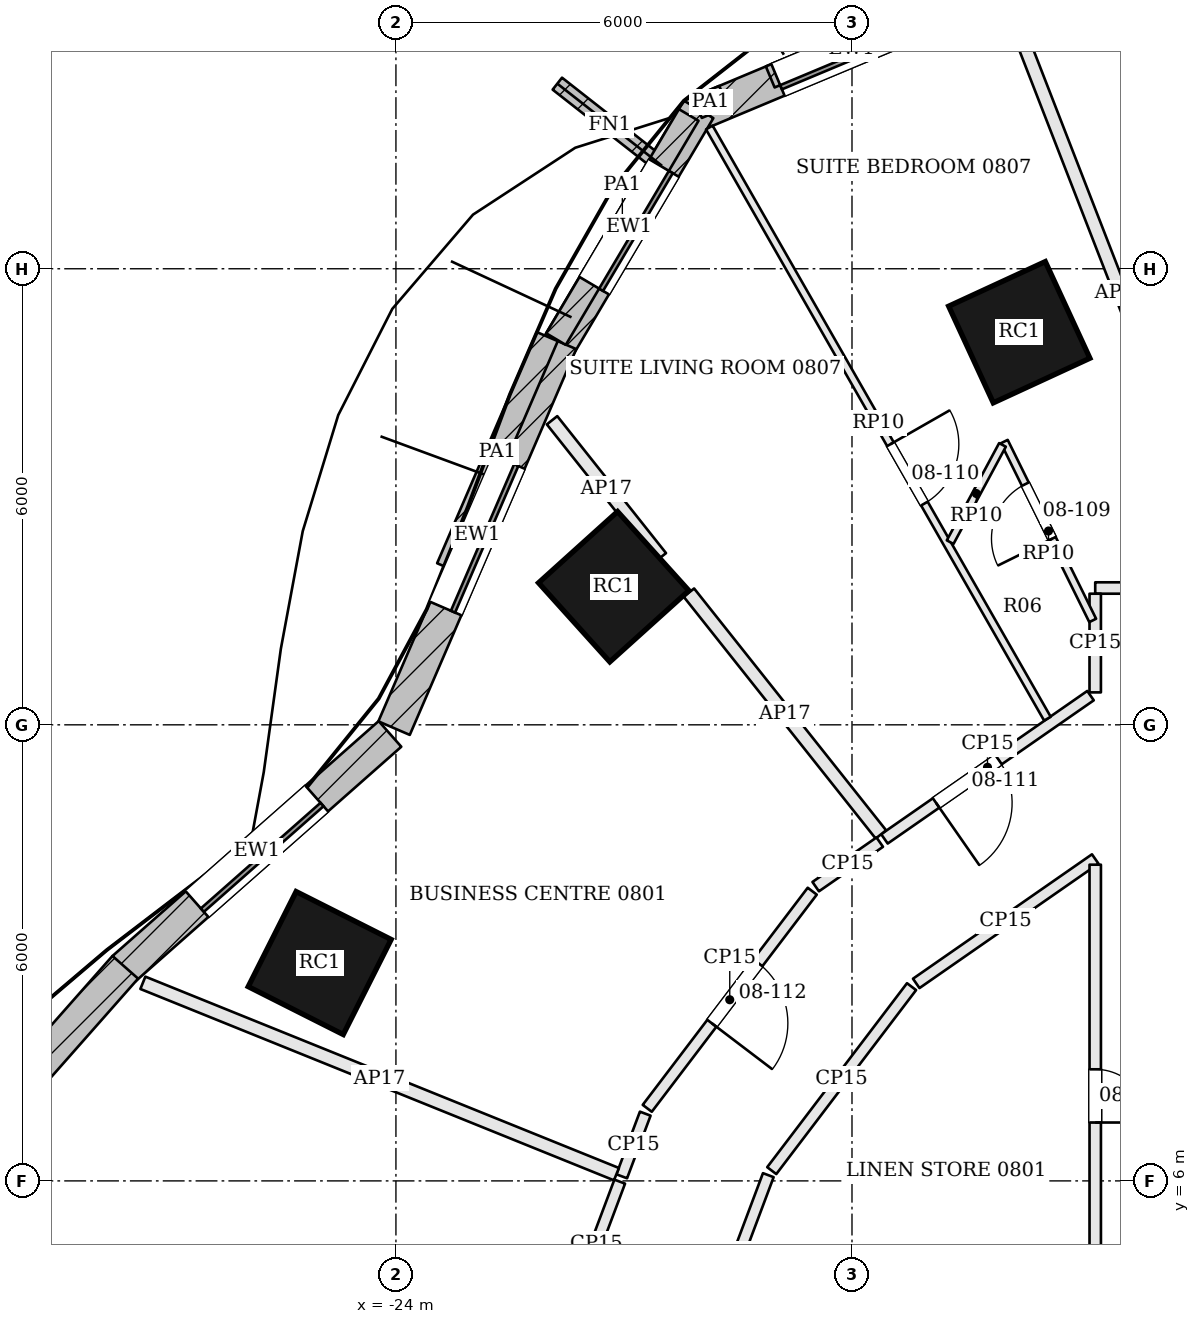
"""IFC4 building model, lengths in metres.
Left out: names, types, materials, properties, quantities, classifications, styles, units other than length and angle.
Written with IfcOpenShell. Run it as: python <this file> out.ifc"""

import sys

from ifc_helpers import new_model, si_unit, direction, frame, frame_2d, origin, origin_2d, place, context, subcontext, project, spatial, rectangle, extrude, element, fill, save


model = new_model("IFC4")
c1 = context("Model", 3, precision=1e-05, world=origin(), true_north=direction((0.0, 1.0)))
c2 = subcontext(c1, "Body", "Model", "MODEL_VIEW")
j1 = project(units=[si_unit("LENGTHUNIT", "METRE"), si_unit("PLANEANGLEUNIT", "RADIAN")], contexts=[c1])
p1 = place(None, origin())
s1 = spatial("IfcSite", under=j1, at=p1, CompositionType="ELEMENT")
p2 = place(p1, origin())
s2 = spatial("IfcBuilding", under=s1, at=p2, CompositionType="ELEMENT")
p3 = place(p2, frame((0.0, 0.0, 44.7)))
s3 = spatial("IfcBuildingStorey", under=s2, at=p3, CompositionType="ELEMENT", Elevation=44.7)
for number, where, z_axis, x_axis in (
    (1, (-15.799, 17.165, 0.0), (0.0, 0.0, 1.0), (-0.908, -0.419, 0.0)),
    (2, (-21.135, 13.817, 0.0), (0.0, 0.0, 1.0), (-0.743, -0.67, 0.0)),
    (3, (-25.003, 8.866, 0.0), (0.0, 0.0, 1.0), (-0.45, -0.893, 0.0)),
):
    element("IfcColumn", number, at=place(p3, frame(where, z_axis=z_axis, x_axis=x_axis)), inside=s3, PredefinedType="COLUMN", context=c2, shape_type="SweptSolid", body=[
        extrude(rectangle(XDim=1.4, YDim=1.4, at=origin_2d()), origin(), (0.0, 0.0, 1.0), 3.6),
    ])
p4 = place(p3, frame((-10.76, 20.698, 0.0), z_axis=(0.0, 0.0, 1.0), x_axis=(-0.980072890434, 0.198638187256, 0.0)))
e4 = element("IfcWall", 4, at=p4, inside=s3, PredefinedType="SOLIDWALL", context=c2, shape_type="SweptSolid", body=[
    extrude(rectangle(XDim=5.36, YDim=0.45, at=frame_2d((2.68, 0.0))), origin(), (0.0, 0.0, 1.0), 3.4),
])
p5 = place(p4, frame((1.63, 0.0, 0.9)))
e5 = element("IfcOpeningElement", 5, at=p5, cuts=e4, PredefinedType="OPENING", context=c2, shape_type="SweptSolid", body=[
    extrude(rectangle(XDim=2.1, YDim=2.0, at=frame_2d((1.05, 1.0))), frame((0.0, 0.235, 0.0), z_axis=(0.0, -1.0, 0.0), x_axis=(1.0, 0.0, 0.0)), (0.0, 0.0, 1.0), 0.47),
])
p6 = place(p3, frame((-15.886, 21.776, 0.0), z_axis=(0.0, 0.0, 1.0), x_axis=(-0.922527247898, -0.385931958882, 0.0)))
e6 = element("IfcWall", 6, at=p6, inside=s3, PredefinedType="SOLIDWALL", context=c2, shape_type="SweptSolid", body=[
    extrude(rectangle(XDim=4.594, YDim=0.45, at=frame_2d((2.297, 0.0))), origin(), (0.0, 0.0, 1.0), 3.4),
])
p7 = place(p6, frame((1.247, 0.0, 0.9)))
e7 = element("IfcOpeningElement", 7, at=p7, cuts=e6, PredefinedType="OPENING", context=c2, shape_type="SweptSolid", body=[
    extrude(rectangle(XDim=2.1, YDim=2.0, at=frame_2d((1.05, 1.0))), frame((0.0, 0.235, 0.0), z_axis=(0.0, -1.0, 0.0), x_axis=(1.0, 0.0, 0.0)), (0.0, 0.0, 1.0), 0.47),
])
p8 = place(p3, frame((-20.017, 20.096, 0.0), z_axis=(0.0, 0.0, 1.0), x_axis=(-0.509718522454, -0.860341227576, 0.0)))
e8 = element("IfcWall", 8, at=p8, inside=s3, PredefinedType="SOLIDWALL", context=c2, shape_type="SweptSolid", body=[
    extrude(rectangle(XDim=3.591, YDim=0.45, at=frame_2d((1.795, 0.0))), origin(), (0.0, 0.0, 1.0), 3.4),
])
p9 = place(p8, frame((0.896, 0.0, 0.9)))
e9 = element("IfcOpeningElement", 9, at=p9, cuts=e8, PredefinedType="OPENING", context=c2, shape_type="SweptSolid", body=[
    extrude(rectangle(XDim=1.8, YDim=2.0, at=frame_2d((0.9, 1.0))), frame((0.0, 0.235, 0.0), z_axis=(0.0, -1.0, 0.0), x_axis=(1.0, 0.0, 0.0)), (0.0, 0.0, 1.0), 0.47),
])
p10 = place(p3, frame((-21.835, 17.032, 0.0), z_axis=(0.0, 0.0, 1.0), x_axis=(-0.396103523022, -0.918205858753, 0.0)))
e10 = element("IfcWall", 10, at=p10, inside=s3, PredefinedType="SOLIDWALL", context=c2, shape_type="SweptSolid", body=[
    extrude(rectangle(XDim=5.528, YDim=0.45, at=frame_2d((2.764, 0.0))), origin(), (0.0, 0.0, 1.0), 3.4),
])
p11 = place(p10, frame((1.714, 0.0, 0.9)))
e11 = element("IfcOpeningElement", 11, at=p11, cuts=e10, PredefinedType="OPENING", context=c2, shape_type="SweptSolid", body=[
    extrude(rectangle(XDim=2.1, YDim=2.0, at=frame_2d((1.05, 1.0))), frame((0.0, 0.235, 0.0), z_axis=(0.0, -1.0, 0.0), x_axis=(1.0, 0.0, 0.0)), (0.0, 0.0, 1.0), 0.47),
])
p12 = place(p3, frame((-24.078, 11.88, 0.0), z_axis=(0.0, 0.0, 1.0), x_axis=(-0.749778352475, -0.661689067583, 0.0)))
e12 = element("IfcWall", 12, at=p12, inside=s3, PredefinedType="SOLIDWALL", context=c2, shape_type="SweptSolid", body=[
    extrude(rectangle(XDim=4.67, YDim=0.45, at=frame_2d((2.335, 0.0))), origin(), (0.0, 0.0, 1.0), 3.4),
])
p13 = place(p12, frame((1.285, 0.0, 0.9)))
e13 = element("IfcOpeningElement", 13, at=p13, cuts=e12, PredefinedType="OPENING", context=c2, shape_type="SweptSolid", body=[
    extrude(rectangle(XDim=2.1, YDim=2.0, at=frame_2d((1.05, 1.0))), frame((0.0, 0.235, 0.0), z_axis=(0.0, -1.0, 0.0), x_axis=(1.0, 0.0, 0.0)), (0.0, 0.0, 1.0), 0.47),
])
p14 = place(p3, frame((-27.561, 8.81, 0.0), z_axis=(0.0, 0.0, 1.0), x_axis=(-0.661706312809, -0.749763132989, 0.0)))
e14 = element("IfcWall", 14, at=p14, inside=s3, PredefinedType="SOLIDWALL", context=c2, shape_type="SweptSolid", body=[
    extrude(rectangle(XDim=5.34, YDim=0.45, at=frame_2d((2.67, 0.0))), origin(), (0.0, 0.0, 1.0), 3.4),
])
p15 = place(p14, frame((1.77, 0.0, 0.9)))
e15 = element("IfcOpeningElement", 15, at=p15, cuts=e14, PredefinedType="OPENING", context=c2, shape_type="SweptSolid", body=[
    extrude(rectangle(XDim=1.8, YDim=2.0, at=frame_2d((0.9, 1.0))), frame((0.0, 0.235, 0.0), z_axis=(0.0, -1.0, 0.0), x_axis=(1.0, 0.0, 0.0)), (0.0, 0.0, 1.0), 0.47),
])
p16 = place(p3, frame((-20.5, 19.355, 0.0), z_axis=(0.0, 0.0, 1.0), x_axis=(-0.786700632228, 0.617334686577, 0.0)))
e16 = element("IfcWall", 16, at=p16, inside=s3, PredefinedType="SOLIDWALL", context=c2, shape_type="SweptSolid", body=[
    extrude(rectangle(XDim=1.75, YDim=0.2, at=frame_2d((0.875, 0.0))), origin(), (0.0, 0.0, 1.0), 3.4),
])
p17 = place(p3, frame((-16.962, 21.407, 3.6), z_axis=(0.0, 0.0, 1.0), x_axis=(-0.922533659014, -0.385916633467, 0.0)))
e17 = element("IfcWall", 17, at=p17, inside=s3, PredefinedType="PARAPET", context=c2, shape_type="SweptSolid", body=[
    extrude(rectangle(XDim=2.291, YDim=0.3, at=frame_2d((1.146, 0.0))), origin(), (0.0, 0.0, 1.0), 1.1),
])
p18 = place(p3, frame((-19.688, 20.267, 3.6), z_axis=(0.0, 0.0, 1.0), x_axis=(-0.922419372029, -0.386189722943, 0.0)))
e18 = element("IfcWall", 18, at=p18, inside=s3, PredefinedType="PARAPET", context=c2, shape_type="SweptSolid", body=[
    extrude(rectangle(XDim=0.374, YDim=0.3, at=frame_2d((0.187, 0.0))), origin(), (0.0, 0.0, 1.0), 1.1),
])
p19 = place(p3, frame((-20.148, 20.023, 3.6), z_axis=(0.0, 0.0, 1.0), x_axis=(-0.509657876052, -0.860377155309, 0.0)))
e19 = element("IfcWall", 19, at=p19, inside=s3, PredefinedType="PARAPET", context=c2, shape_type="SweptSolid", body=[
    extrude(rectangle(XDim=3.427, YDim=0.3, at=frame_2d((1.713, 0.0))), origin(), (0.0, 0.0, 1.0), 1.1),
])
p20 = place(p3, frame((-22.009, 17.107, 3.6), z_axis=(0.0, 0.0, 1.0), x_axis=(-0.396142292889, -0.918189132905, 0.0)))
e20 = element("IfcWall", 20, at=p20, inside=s3, PredefinedType="PARAPET", context=c2, shape_type="SweptSolid", body=[
    extrude(rectangle(XDim=3.312, YDim=0.3, at=frame_2d((1.656, 0.0))), origin(), (0.0, 0.0, 1.0), 1.1),
])
p21 = place(p3, frame((-15.948, 21.502, 0.0), z_axis=(0.0, 0.0, 1.0), x_axis=(0.362227551465, -0.932089695769, 0.0)))
e21 = element("IfcWall", 21, at=p21, inside=s3, PredefinedType="PARTITIONING", context=c2, shape_type="SweptSolid", body=[
    extrude(rectangle(XDim=8.188, YDim=0.175, at=frame_2d((4.094, 0.0))), origin(), (0.0, 0.0, 1.0), 2.68),
])
p22 = place(p3, frame((-13.03, 13.8, 0.0), z_axis=(0.0, 0.0, 1.0), x_axis=(-1.0, 0.0, 0.0)))
e22 = element("IfcWall", 22, at=p22, inside=s3, PredefinedType="PARTITIONING", context=c2, shape_type="SweptSolid", body=[
    extrude(rectangle(XDim=1.77, YDim=0.15, at=frame_2d((0.885, 0.0))), origin(), (0.0, 0.0, 1.0), 2.68),
])
p23 = place(p3, frame((-14.8, 13.725, 0.0), z_axis=(0.0, 0.0, 1.0), x_axis=(-0.000188040613, -0.99999998232, 0.0)))
e23 = element("IfcWall", 23, at=p23, inside=s3, PredefinedType="PARTITIONING", context=c2, shape_type="SweptSolid", body=[
    extrude(rectangle(XDim=1.298, YDim=0.15, at=frame_2d((0.649, 0.0))), origin(), (0.0, 0.0, 1.0), 2.68),
])
p24 = place(p3, frame((-14.862, 12.384, 0.0), z_axis=(0.0, 0.0, 1.0), x_axis=(-0.821144742038, -0.570719994939, 0.0)))
e24 = element("IfcWall", 24, at=p24, inside=s3, PredefinedType="PARTITIONING", context=c2, shape_type="SweptSolid", body=[
    extrude(rectangle(XDim=3.302, YDim=0.15, at=frame_2d((1.651, 0.0))), origin(), (0.0, 0.0, 1.0), 2.68),
])
p25 = place(p24, frame((1.474, 0.0, 0.0)))
e25 = element("IfcOpeningElement", 25, at=p25, cuts=e24, PredefinedType="OPENING", context=c2, shape_type="SweptSolid", body=[
    extrude(rectangle(XDim=1.0, YDim=2.1, at=frame_2d((0.5, 1.05))), frame((0.0, 0.085, 0.0), z_axis=(0.0, -1.0, 0.0), x_axis=(1.0, 0.0, 0.0)), (0.0, 0.0, 1.0), 0.17),
])
p26 = place(p3, frame((-21.946, 16.007, 0.0), z_axis=(0.0, 0.0, 1.0), x_axis=(0.621870662711, -0.783119964539, 0.0)))
e26 = element("IfcWall", 26, at=p26, inside=s3, PredefinedType="PARTITIONING", context=c2, shape_type="SweptSolid", body=[
    extrude(rectangle(XDim=2.301, YDim=0.175, at=frame_2d((1.151, 0.0))), origin(), (0.0, 0.0, 1.0), 2.68),
])
p27 = place(p3, frame((-20.146, 13.74, 0.0), z_axis=(0.0, 0.0, 1.0), x_axis=(0.621832273855, -0.783150447355, 0.0)))
e27 = element("IfcWall", 27, at=p27, inside=s3, PredefinedType="PARTITIONING", context=c2, shape_type="SweptSolid", body=[
    extrude(rectangle(XDim=4.062, YDim=0.175, at=frame_2d((2.031, 0.0))), origin(), (0.0, 0.0, 1.0), 2.68),
])
p28 = place(p3, frame((-17.635, 10.457, 0.0), z_axis=(0.0, 0.0, 1.0), x_axis=(-0.821171783561, -0.570681085969, 0.0)))
e28 = element("IfcWall", 28, at=p28, inside=s3, PredefinedType="PARTITIONING", context=c2, shape_type="SweptSolid", body=[
    extrude(rectangle(XDim=1.026, YDim=0.15, at=frame_2d((0.513, 0.0))), origin(), (0.0, 0.0, 1.0), 2.68),
])
p29 = place(p3, frame((-18.523, 9.811, 0.0), z_axis=(0.0, 0.0, 1.0), x_axis=(-0.605040130963, -0.796194976073, 0.0)))
e29 = element("IfcWall", 29, at=p29, inside=s3, PredefinedType="PARTITIONING", context=c2, shape_type="SweptSolid", body=[
    extrude(rectangle(XDim=3.588, YDim=0.15, at=frame_2d((1.794, 0.0))), origin(), (0.0, 0.0, 1.0), 2.68),
])
p30 = place(p29, frame((1.183, 0.0, 0.0)))
e30 = element("IfcOpeningElement", 30, at=p30, cuts=e29, PredefinedType="OPENING", context=c2, shape_type="SweptSolid", body=[
    extrude(rectangle(XDim=1.0, YDim=2.1, at=frame_2d((0.5, 1.05))), frame((0.0, 0.085, 0.0), z_axis=(0.0, -1.0, 0.0), x_axis=(1.0, 0.0, 0.0)), (0.0, 0.0, 1.0), 0.17),
])
p31 = place(p3, frame((-20.72, 6.885, 0.0), z_axis=(0.0, 0.0, 1.0), x_axis=(-0.351457811596, -0.936203720708, 0.0)))
e31 = element("IfcWall", 31, at=p31, inside=s3, PredefinedType="PARTITIONING", context=c2, shape_type="SweptSolid", body=[
    extrude(rectangle(XDim=0.88, YDim=0.15, at=frame_2d((0.44, 0.0))), origin(), (0.0, 0.0, 1.0), 2.68),
])
p32 = place(p3, frame((-27.329, 8.606, 0.0), z_axis=(0.0, 0.0, 1.0), x_axis=(0.92718069074, -0.374614424068, 0.0)))
e32 = element("IfcWall", 32, at=p32, inside=s3, PredefinedType="PARTITIONING", context=c2, shape_type="SweptSolid", body=[
    extrude(rectangle(XDim=6.72, YDim=0.175, at=frame_2d((3.36, 0.0))), origin(), (0.0, 0.0, 1.0), 2.68),
])
p33 = place(p3, frame((-21.056, 5.99, 0.0), z_axis=(0.0, 0.0, 1.0), x_axis=(-0.351445911603, -0.936208187967, 0.0)))
e33 = element("IfcWall", 33, at=p33, inside=s3, PredefinedType="PARTITIONING", context=c2, shape_type="SweptSolid", body=[
    extrude(rectangle(XDim=1.742, YDim=0.15, at=frame_2d((0.871, 0.0))), origin(), (0.0, 0.0, 1.0), 2.68),
])
p34 = place(p3, frame((-19.884, 3.99, 0.0), z_axis=(0.0, 0.0, 1.0), x_axis=(0.351423736928, 0.936216511884, 0.0)))
e34 = element("IfcWall", 34, at=p34, inside=s3, PredefinedType="PARTITIONING", context=c2, shape_type="SweptSolid", body=[
    extrude(rectangle(XDim=2.227, YDim=0.15, at=frame_2d((1.114, 0.0))), origin(), (0.0, 0.0, 1.0), 2.68),
])
p35 = place(p3, frame((-19.056, 6.135, 0.0), z_axis=(0.0, 0.0, 1.0), x_axis=(0.604999774258, 0.796225642107, 0.0)))
e35 = element("IfcWall", 35, at=p35, inside=s3, PredefinedType="PARTITIONING", context=c2, shape_type="SweptSolid", body=[
    extrude(rectangle(XDim=3.04, YDim=0.15, at=frame_2d((1.52, 0.0))), origin(), (0.0, 0.0, 1.0), 2.68),
])
p36 = place(p3, frame((-17.155, 8.598, 0.0), z_axis=(0.0, 0.0, 1.0), x_axis=(0.821087350938, 0.570802559673, 0.0)))
e36 = element("IfcWall", 36, at=p36, inside=s3, PredefinedType="PARTITIONING", context=c2, shape_type="SweptSolid", body=[
    extrude(rectangle(XDim=2.868, YDim=0.15, at=frame_2d((1.434, 0.0))), origin(), (0.0, 0.0, 1.0), 2.68),
])
p37 = place(p3, frame((-14.8, 10.16, 0.0), z_axis=(0.0, 0.0, 1.0), x_axis=(0.0, -1.0, 0.0)))
e37 = element("IfcWall", 37, at=p37, inside=s3, PredefinedType="PARTITIONING", context=c2, shape_type="SweptSolid", body=[
    extrude(rectangle(XDim=14.96, YDim=0.15, at=frame_2d((7.48, 0.0))), origin(), (0.0, 0.0, 1.0), 2.68),
])
p38 = place(p37, frame((2.692, 0.0, 0.0)))
e38 = element("IfcOpeningElement", 38, at=p38, cuts=e37, PredefinedType="OPENING", context=c2, shape_type="SweptSolid", body=[
    extrude(rectangle(XDim=0.7, YDim=2.1, at=frame_2d((0.35, 1.05))), frame((0.0, 0.085, 0.0), z_axis=(0.0, -1.0, 0.0), x_axis=(1.0, 0.0, 0.0)), (0.0, 0.0, 1.0), 0.17),
])
p39 = place(p37, frame((9.66, 0.0, 0.0)))
e39 = element("IfcOpeningElement", 39, at=p39, cuts=e37, PredefinedType="OPENING", context=c2, shape_type="SweptSolid", body=[
    extrude(rectangle(XDim=1.0, YDim=2.1, at=frame_2d((0.5, 1.05))), frame((0.0, 0.085, 0.0), z_axis=(0.0, -1.0, 0.0), x_axis=(1.0, 0.0, 0.0)), (0.0, 0.0, 1.0), 0.17),
])
p40 = place(p3, frame((-19.877, 19.859, 0.0), z_axis=(0.0, 0.0, 1.0), x_axis=(0.496435286224, -0.868073733384, 0.0)))
e40 = element("IfcWall", 40, at=p40, inside=s3, PredefinedType="PARTITIONING", context=c2, shape_type="SweptSolid", body=[
    extrude(rectangle(XDim=8.96, YDim=0.1, at=frame_2d((4.48, 0.0))), origin(), (0.0, 0.0, 1.0), 2.68),
])
p41 = place(p40, frame((4.8, 0.0, 0.0)))
e41 = element("IfcOpeningElement", 41, at=p41, cuts=e40, PredefinedType="OPENING", context=c2, shape_type="SweptSolid", body=[
    extrude(rectangle(XDim=0.9, YDim=2.4, at=frame_2d((0.45, 1.2))), frame((0.0, 0.06, 0.0), z_axis=(0.0, -1.0, 0.0), x_axis=(1.0, 0.0, 0.0)), (0.0, 0.0, 1.0), 0.12),
])
p42 = place(p3, frame((-14.833, 13.373, 0.0), z_axis=(0.0, 0.0, 1.0), x_axis=(-0.44307937406, 0.89648238593, 0.0)))
e42 = element("IfcWall", 42, at=p42, inside=s3, PredefinedType="PARTITIONING", context=c2, shape_type="SweptSolid", body=[
    extrude(rectangle(XDim=2.625, YDim=0.1, at=frame_2d((1.312, 0.0))), origin(), (0.0, 0.0, 1.0), 2.68),
])
p43 = place(p42, frame((1.2, 0.0, 0.0)))
e43 = element("IfcOpeningElement", 43, at=p43, cuts=e42, PredefinedType="OPENING", context=c2, shape_type="SweptSolid", body=[
    extrude(rectangle(XDim=0.8, YDim=2.1, at=frame_2d((0.4, 1.05))), frame((0.0, 0.06, 0.0), z_axis=(0.0, -1.0, 0.0), x_axis=(1.0, 0.0, 0.0)), (0.0, 0.0, 1.0), 0.12),
])
p44 = place(p3, frame((-16.02, 15.683, 0.0), z_axis=(0.0, 0.0, 1.0), x_axis=(-0.474029678045, -0.880508866698, 0.0)))
e44 = element("IfcWall", 44, at=p44, inside=s3, PredefinedType="PARTITIONING", context=c2, shape_type="SweptSolid", body=[
    extrude(rectangle(XDim=1.453, YDim=0.1, at=frame_2d((0.727, 0.0))), origin(), (0.0, 0.0, 1.0), 2.68),
])
p45 = place(p7, origin())
e45 = element("IfcWindow", 45, at=p45, inside=s3, PartitioningType="SINGLE_PANEL", PredefinedType="WINDOW", context=c2, shape_type="SweptSolid", body=[
    extrude(rectangle(XDim=2.1, YDim=2.0, at=frame_2d((1.05, 1.0))), frame((0.0, 0.135, 0.0), z_axis=(0.0, -1.0, 0.0), x_axis=(1.0, 0.0, 0.0)), (0.0, 0.0, 1.0), 0.06),
])
fill(e7, e45)
p46 = place(p9, origin())
e46 = element("IfcWindow", 46, at=p46, inside=s3, PartitioningType="SINGLE_PANEL", PredefinedType="WINDOW", context=c2, shape_type="SweptSolid", body=[
    extrude(rectangle(XDim=1.8, YDim=2.0, at=frame_2d((0.9, 1.0))), frame((0.0, 0.135, 0.0), z_axis=(0.0, -1.0, 0.0), x_axis=(1.0, 0.0, 0.0)), (0.0, 0.0, 1.0), 0.06),
])
fill(e9, e46)
p47 = place(p11, origin())
e47 = element("IfcWindow", 47, at=p47, inside=s3, PartitioningType="SINGLE_PANEL", PredefinedType="WINDOW", context=c2, shape_type="SweptSolid", body=[
    extrude(rectangle(XDim=2.1, YDim=2.0, at=frame_2d((1.05, 1.0))), frame((0.0, 0.135, 0.0), z_axis=(0.0, -1.0, 0.0), x_axis=(1.0, 0.0, 0.0)), (0.0, 0.0, 1.0), 0.06),
])
fill(e11, e47)
p48 = place(p13, origin())
e48 = element("IfcWindow", 48, at=p48, inside=s3, PartitioningType="SINGLE_PANEL", PredefinedType="WINDOW", context=c2, shape_type="SweptSolid", body=[
    extrude(rectangle(XDim=2.1, YDim=2.0, at=frame_2d((1.05, 1.0))), frame((0.0, 0.135, 0.0), z_axis=(0.0, -1.0, 0.0), x_axis=(1.0, 0.0, 0.0)), (0.0, 0.0, 1.0), 0.06),
])
fill(e13, e48)
p49 = place(p43, origin())
e49 = element("IfcDoor", 49, at=p49, inside=s3, OperationType="SINGLE_SWING_LEFT", PredefinedType="DOOR", context=c2, shape_type="SweptSolid", body=[
    extrude(rectangle(XDim=0.8, YDim=2.1, at=frame_2d((0.4, 1.05))), frame((0.0, 0.025, 0.0), z_axis=(0.0, -1.0, 0.0), x_axis=(1.0, 0.0, 0.0)), (0.0, 0.0, 1.0), 0.05),
])
fill(e43, e49)
p50 = place(p41, origin())
e50 = element("IfcDoor", 50, at=p50, inside=s3, OperationType="SINGLE_SWING_LEFT", PredefinedType="DOOR", context=c2, shape_type="SweptSolid", body=[
    extrude(rectangle(XDim=0.9, YDim=2.4, at=frame_2d((0.45, 1.2))), frame((0.0, 0.025, 0.0), z_axis=(0.0, -1.0, 0.0), x_axis=(1.0, 0.0, 0.0)), (0.0, 0.0, 1.0), 0.05),
])
fill(e41, e50)
p51 = place(p25, origin())
e51 = element("IfcDoor", 51, at=p51, inside=s3, OperationType="SINGLE_SWING_RIGHT", PredefinedType="DOOR", context=c2, shape_type="SweptSolid", body=[
    extrude(rectangle(XDim=1.0, YDim=2.1, at=frame_2d((0.5, 1.05))), frame((0.0, 0.025, 0.0), z_axis=(0.0, -1.0, 0.0), x_axis=(1.0, 0.0, 0.0)), (0.0, 0.0, 1.0), 0.05),
])
fill(e25, e51)
p52 = place(p30, origin())
e52 = element("IfcDoor", 52, at=p52, inside=s3, OperationType="SINGLE_SWING_RIGHT", PredefinedType="DOOR", context=c2, shape_type="SweptSolid", body=[
    extrude(rectangle(XDim=1.0, YDim=2.1, at=frame_2d((0.5, 1.05))), frame((0.0, 0.025, 0.0), z_axis=(0.0, -1.0, 0.0), x_axis=(1.0, 0.0, 0.0)), (0.0, 0.0, 1.0), 0.05),
])
fill(e30, e52)
p53 = place(p38, origin())
e53 = element("IfcDoor", 53, at=p53, inside=s3, OperationType="SINGLE_SWING_RIGHT", PredefinedType="DOOR", context=c2, shape_type="SweptSolid", body=[
    extrude(rectangle(XDim=0.7, YDim=2.1, at=frame_2d((0.35, 1.05))), frame((0.0, 0.025, 0.0), z_axis=(0.0, -1.0, 0.0), x_axis=(1.0, 0.0, 0.0)), (0.0, 0.0, 1.0), 0.05),
])
fill(e38, e53)
save(model, sys.argv[1])
